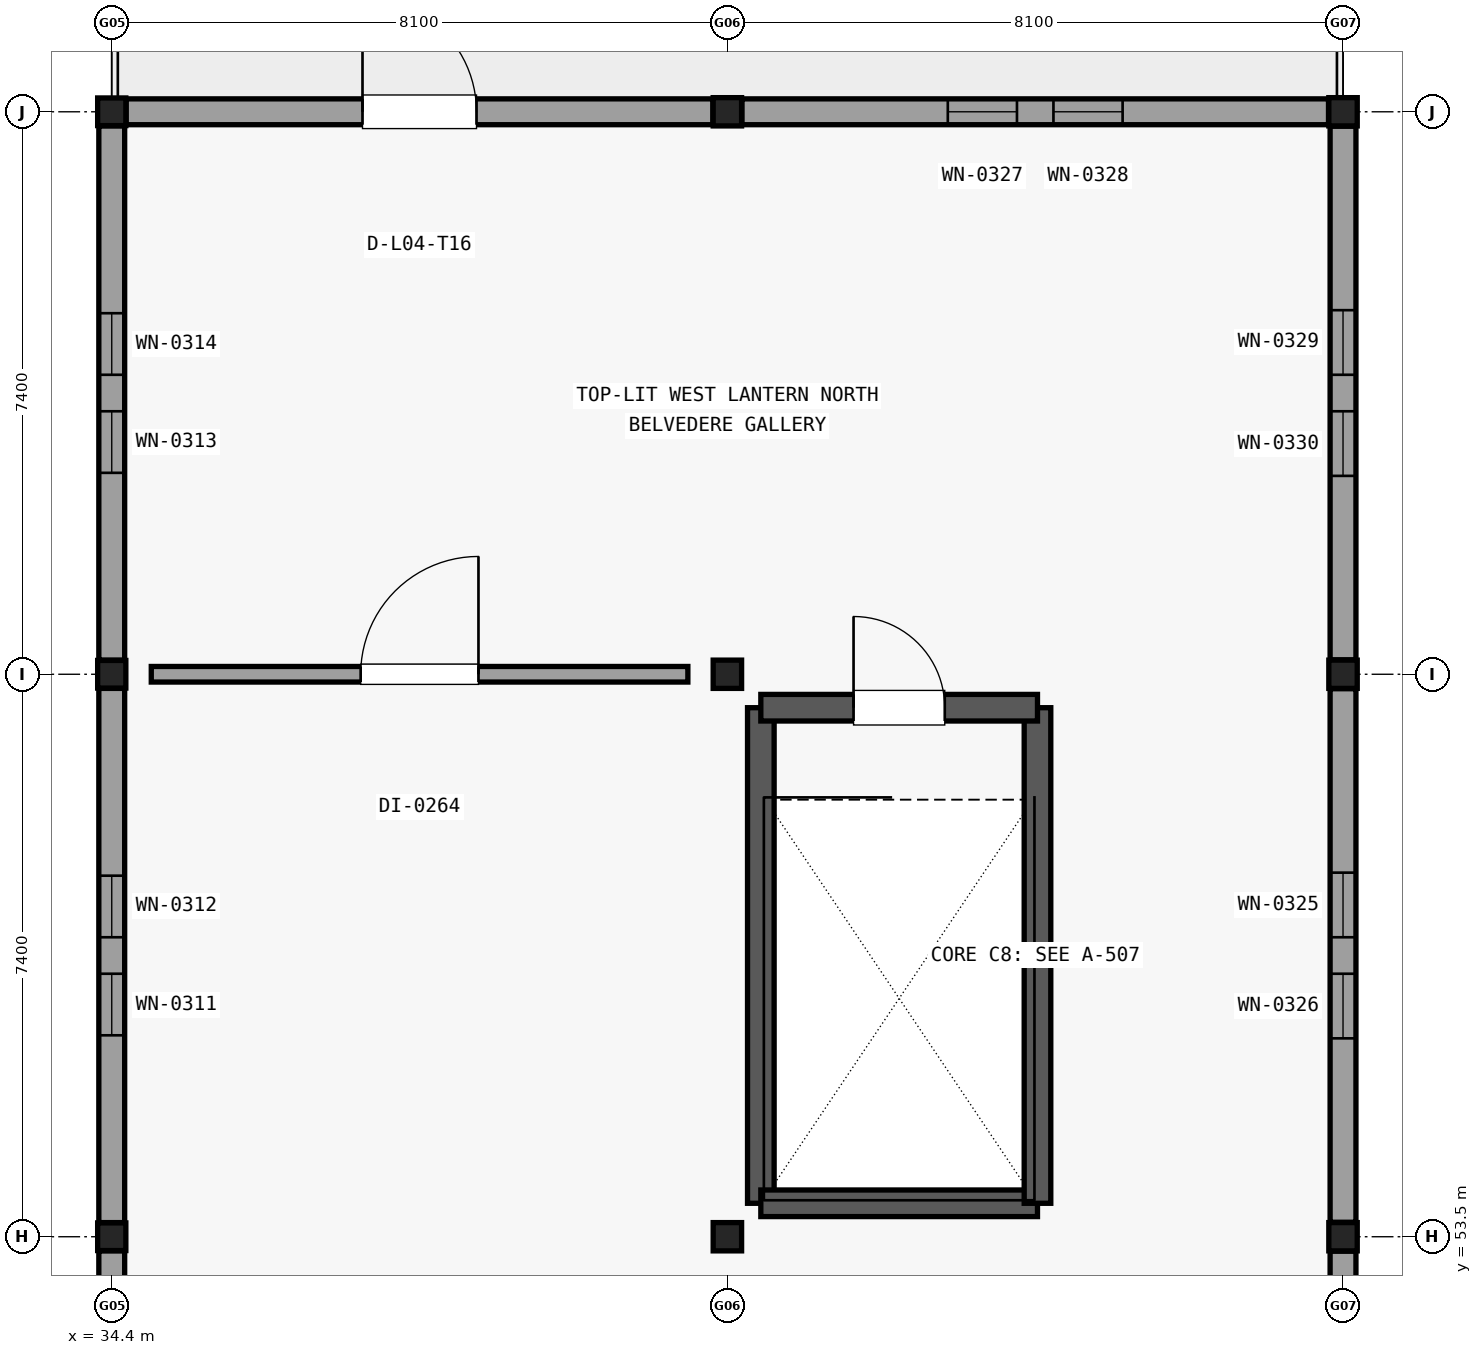
"""IFC4 building model, lengths in metres.
Left out: names, types, materials, properties, quantities, classifications, styles, units other than length and angle.
Written with IfcOpenShell. Run it as: python <this file> out.ifc"""

import sys

from ifc_helpers import new_model, si_unit, direction, frame, frame_2d, origin, origin_2d, place, context, subcontext, project, spatial, rectangle, i_section, extrude, element, fill, save


model = new_model("IFC4")
c1 = context("Model", 3, precision=1e-05, world=origin(), true_north=direction((0.0, 1.0)))
c2 = subcontext(c1, "Body", "Model", "MODEL_VIEW")
j1 = project(units=[si_unit("LENGTHUNIT", "METRE"), si_unit("PLANEANGLEUNIT", "RADIAN")], contexts=[c1])
p1 = place(None, origin())
s1 = spatial("IfcSite", under=j1, at=p1, CompositionType="ELEMENT")
p2 = place(p1, origin())
s2 = spatial("IfcBuilding", under=s1, at=p2, CompositionType="ELEMENT")
p3 = place(p2, frame((0.0, 0.0, 17.4)))
s3 = spatial("IfcBuildingStorey", under=s2, at=p3, CompositionType="ELEMENT", Elevation=17.4)
for number, where, z_axis, x_axis in (
    (1, (34.4, 53.5, 0.0), (0.0, 0.0, 1.0), (1.0, 0.0, 0.0)),
    (2, (34.4, 60.9, 0.0), (0.0, 0.0, 1.0), (1.0, 0.0, 0.0)),
    (3, (34.4, 68.3, 0.0), (0.0, 0.0, 1.0), (1.0, 0.0, 0.0)),
):
    element("IfcColumn", number, at=place(p3, frame(where, z_axis=z_axis, x_axis=x_axis)), inside=s3, PredefinedType="COLUMN", context=c2, shape_type="SweptSolid", body=[
        extrude(i_section(OverallWidth=0.371, OverallDepth=0.364, WebThickness=0.013, FlangeThickness=0.022, at=origin_2d()), origin(), (0.0, 0.0, 1.0), 3.38),
    ])
for number, where, z_axis, x_axis in (
    (4, (42.5, 53.5, 0.0), (0.0, 0.0, 1.0), (1.0, 0.0, 0.0)),
    (5, (42.5, 60.9, 0.0), (0.0, 0.0, 1.0), (1.0, 0.0, 0.0)),
    (6, (42.5, 68.3, 0.0), (0.0, 0.0, 1.0), (1.0, 0.0, 0.0)),
    (7, (50.6, 53.5, 0.0), (0.0, 0.0, 1.0), (1.0, 0.0, 0.0)),
    (8, (50.6, 60.9, 0.0), (0.0, 0.0, 1.0), (1.0, 0.0, 0.0)),
    (9, (50.6, 68.3, 0.0), (0.0, 0.0, 1.0), (1.0, 0.0, 0.0)),
):
    element("IfcColumn", number, at=place(p3, frame(where, z_axis=z_axis, x_axis=x_axis)), inside=s3, PredefinedType="COLUMN", context=c2, shape_type="SweptSolid", body=[
        extrude(i_section(OverallWidth=0.374, OverallDepth=0.372, WebThickness=0.016, FlangeThickness=0.026, at=origin_2d()), origin(), (0.0, 0.0, 1.0), 3.38),
    ])
p4 = place(p3, frame((34.4, 46.286, 0.0), z_axis=(0.0, 0.0, 1.0), x_axis=(0.0, 1.0, 0.0)))
e10 = element("IfcWall", 10, at=p4, inside=s3, PredefinedType="SOLIDWALL", context=c2, shape_type="SweptSolid", body=[
    extrude(rectangle(XDim=7.028, YDim=0.34, at=frame_2d((3.514, 0.0))), origin(), (0.0, 0.0, 1.0), 2.908),
])
p5 = place(p4, frame((2.464, 0.0, 0.6)))
e11 = element("IfcOpeningElement", 11, at=p5, cuts=e10, PredefinedType="OPENING", context=c2, shape_type="SweptSolid", body=[
    extrude(rectangle(XDim=0.81, YDim=1.84, at=frame_2d((0.405, 0.92))), frame((0.0, 0.18, 0.0), z_axis=(0.0, -1.0, 0.0), x_axis=(1.0, 0.0, 0.0)), (0.0, 0.0, 1.0), 0.36),
])
p6 = place(p4, frame((3.754, 0.0, 0.6)))
e12 = element("IfcOpeningElement", 12, at=p6, cuts=e10, PredefinedType="OPENING", context=c2, shape_type="SweptSolid", body=[
    extrude(rectangle(XDim=0.81, YDim=1.84, at=frame_2d((0.405, 0.92))), frame((0.0, 0.18, 0.0), z_axis=(0.0, -1.0, 0.0), x_axis=(1.0, 0.0, 0.0)), (0.0, 0.0, 1.0), 0.36),
])
p7 = place(p3, frame((34.4, 53.686, 0.0), z_axis=(0.0, 0.0, 1.0), x_axis=(0.0, 1.0, 0.0)))
e13 = element("IfcWall", 13, at=p7, inside=s3, PredefinedType="SOLIDWALL", context=c2, shape_type="SweptSolid", body=[
    extrude(rectangle(XDim=7.028, YDim=0.34, at=frame_2d((3.514, 0.0))), origin(), (0.0, 0.0, 1.0), 2.908),
])
p8 = place(p7, frame((2.464, 0.0, 0.6)))
e14 = element("IfcOpeningElement", 14, at=p8, cuts=e13, PredefinedType="OPENING", context=c2, shape_type="SweptSolid", body=[
    extrude(rectangle(XDim=0.81, YDim=1.84, at=frame_2d((0.405, 0.92))), frame((0.0, 0.18, 0.0), z_axis=(0.0, -1.0, 0.0), x_axis=(1.0, 0.0, 0.0)), (0.0, 0.0, 1.0), 0.36),
])
p9 = place(p7, frame((3.754, 0.0, 0.6)))
e15 = element("IfcOpeningElement", 15, at=p9, cuts=e13, PredefinedType="OPENING", context=c2, shape_type="SweptSolid", body=[
    extrude(rectangle(XDim=0.81, YDim=1.84, at=frame_2d((0.405, 0.92))), frame((0.0, 0.18, 0.0), z_axis=(0.0, -1.0, 0.0), x_axis=(1.0, 0.0, 0.0)), (0.0, 0.0, 1.0), 0.36),
])
p10 = place(p3, frame((34.59, 68.3, 0.0), z_axis=(0.0, 0.0, 1.0), x_axis=(1.0, 0.0, 0.0)))
e16 = element("IfcWall", 16, at=p10, inside=s3, PredefinedType="SOLIDWALL", context=c2, shape_type="SweptSolid", body=[
    extrude(rectangle(XDim=7.719, YDim=0.34, at=frame_2d((3.86, 0.0))), origin(), (0.0, 0.0, 1.0), 2.908),
])
p11 = place(p10, frame((3.11, 0.0, 0.0)))
e17 = element("IfcOpeningElement", 17, at=p11, cuts=e16, PredefinedType="OPENING", context=c2, shape_type="SweptSolid", body=[
    extrude(rectangle(XDim=1.5, YDim=2.1, at=frame_2d((0.75, 1.05))), frame((0.0, 0.18, 0.0), z_axis=(0.0, -1.0, 0.0), x_axis=(1.0, 0.0, 0.0)), (0.0, 0.0, 1.0), 0.36),
])
p12 = place(p3, frame((34.4, 61.086, 0.0), z_axis=(0.0, 0.0, 1.0), x_axis=(0.0, 1.0, 0.0)))
e18 = element("IfcWall", 18, at=p12, inside=s3, PredefinedType="SOLIDWALL", context=c2, shape_type="SweptSolid", body=[
    extrude(rectangle(XDim=7.028, YDim=0.34, at=frame_2d((3.514, 0.0))), origin(), (0.0, 0.0, 1.0), 2.908),
])
p13 = place(p12, frame((2.464, 0.0, 0.6)))
e19 = element("IfcOpeningElement", 19, at=p13, cuts=e18, PredefinedType="OPENING", context=c2, shape_type="SweptSolid", body=[
    extrude(rectangle(XDim=0.81, YDim=1.84, at=frame_2d((0.405, 0.92))), frame((0.0, 0.18, 0.0), z_axis=(0.0, -1.0, 0.0), x_axis=(1.0, 0.0, 0.0)), (0.0, 0.0, 1.0), 0.36),
])
p14 = place(p12, frame((3.754, 0.0, 0.6)))
e20 = element("IfcOpeningElement", 20, at=p14, cuts=e18, PredefinedType="OPENING", context=c2, shape_type="SweptSolid", body=[
    extrude(rectangle(XDim=0.81, YDim=1.84, at=frame_2d((0.405, 0.92))), frame((0.0, 0.18, 0.0), z_axis=(0.0, -1.0, 0.0), x_axis=(1.0, 0.0, 0.0)), (0.0, 0.0, 1.0), 0.36),
])
p15 = place(p3, frame((50.6, 53.31, 0.0), z_axis=(0.0, 0.0, 1.0), x_axis=(0.0, -1.0, 0.0)))
e21 = element("IfcWall", 21, at=p15, inside=s3, PredefinedType="SOLIDWALL", context=c2, shape_type="SweptSolid", body=[
    extrude(rectangle(XDim=7.02, YDim=0.34, at=frame_2d((3.51, 0.0))), origin(), (0.0, 0.0, 1.0), 2.908),
])
p16 = place(p15, frame((2.42, 0.0, 0.6)))
e22 = element("IfcOpeningElement", 22, at=p16, cuts=e21, PredefinedType="OPENING", context=c2, shape_type="SweptSolid", body=[
    extrude(rectangle(XDim=0.85, YDim=1.88, at=frame_2d((0.425, 0.94))), frame((0.0, 0.18, 0.0), z_axis=(0.0, -1.0, 0.0), x_axis=(1.0, 0.0, 0.0)), (0.0, 0.0, 1.0), 0.36),
])
p17 = place(p15, frame((3.75, 0.0, 0.6)))
e23 = element("IfcOpeningElement", 23, at=p17, cuts=e21, PredefinedType="OPENING", context=c2, shape_type="SweptSolid", body=[
    extrude(rectangle(XDim=0.85, YDim=1.88, at=frame_2d((0.425, 0.94))), frame((0.0, 0.18, 0.0), z_axis=(0.0, -1.0, 0.0), x_axis=(1.0, 0.0, 0.0)), (0.0, 0.0, 1.0), 0.36),
])
p18 = place(p3, frame((50.6, 60.71, 0.0), z_axis=(0.0, 0.0, 1.0), x_axis=(0.0, -1.0, 0.0)))
e24 = element("IfcWall", 24, at=p18, inside=s3, PredefinedType="SOLIDWALL", context=c2, shape_type="SweptSolid", body=[
    extrude(rectangle(XDim=7.02, YDim=0.34, at=frame_2d((3.51, 0.0))), origin(), (0.0, 0.0, 1.0), 2.908),
])
p19 = place(p18, frame((2.42, 0.0, 0.6)))
e25 = element("IfcOpeningElement", 25, at=p19, cuts=e24, PredefinedType="OPENING", context=c2, shape_type="SweptSolid", body=[
    extrude(rectangle(XDim=0.85, YDim=1.88, at=frame_2d((0.425, 0.94))), frame((0.0, 0.18, 0.0), z_axis=(0.0, -1.0, 0.0), x_axis=(1.0, 0.0, 0.0)), (0.0, 0.0, 1.0), 0.36),
])
p20 = place(p18, frame((3.75, 0.0, 0.6)))
e26 = element("IfcOpeningElement", 26, at=p20, cuts=e24, PredefinedType="OPENING", context=c2, shape_type="SweptSolid", body=[
    extrude(rectangle(XDim=0.85, YDim=1.88, at=frame_2d((0.425, 0.94))), frame((0.0, 0.18, 0.0), z_axis=(0.0, -1.0, 0.0), x_axis=(1.0, 0.0, 0.0)), (0.0, 0.0, 1.0), 0.36),
])
p21 = place(p3, frame((42.691, 68.3, 0.0), z_axis=(0.0, 0.0, 1.0), x_axis=(1.0, 0.0, 0.0)))
e27 = element("IfcWall", 27, at=p21, inside=s3, PredefinedType="SOLIDWALL", context=c2, shape_type="SweptSolid", body=[
    extrude(rectangle(XDim=7.718, YDim=0.34, at=frame_2d((3.859, 0.0))), origin(), (0.0, 0.0, 1.0), 2.908),
])
p22 = place(p21, frame((2.709, 0.0, 0.6)))
e28 = element("IfcOpeningElement", 28, at=p22, cuts=e27, PredefinedType="OPENING", context=c2, shape_type="SweptSolid", body=[
    extrude(rectangle(XDim=0.91, YDim=1.94, at=frame_2d((0.455, 0.97))), frame((0.0, 0.18, 0.0), z_axis=(0.0, -1.0, 0.0), x_axis=(1.0, 0.0, 0.0)), (0.0, 0.0, 1.0), 0.36),
])
p23 = place(p21, frame((4.099, 0.0, 0.6)))
e29 = element("IfcOpeningElement", 29, at=p23, cuts=e27, PredefinedType="OPENING", context=c2, shape_type="SweptSolid", body=[
    extrude(rectangle(XDim=0.91, YDim=1.94, at=frame_2d((0.455, 0.97))), frame((0.0, 0.18, 0.0), z_axis=(0.0, -1.0, 0.0), x_axis=(1.0, 0.0, 0.0)), (0.0, 0.0, 1.0), 0.36),
])
p24 = place(p3, frame((50.6, 68.11, 0.0), z_axis=(0.0, 0.0, 1.0), x_axis=(0.0, -1.0, 0.0)))
e30 = element("IfcWall", 30, at=p24, inside=s3, PredefinedType="SOLIDWALL", context=c2, shape_type="SweptSolid", body=[
    extrude(rectangle(XDim=7.02, YDim=0.34, at=frame_2d((3.51, 0.0))), origin(), (0.0, 0.0, 1.0), 2.908),
])
p25 = place(p24, frame((2.42, 0.0, 0.6)))
e31 = element("IfcOpeningElement", 31, at=p25, cuts=e30, PredefinedType="OPENING", context=c2, shape_type="SweptSolid", body=[
    extrude(rectangle(XDim=0.85, YDim=1.88, at=frame_2d((0.425, 0.94))), frame((0.0, 0.18, 0.0), z_axis=(0.0, -1.0, 0.0), x_axis=(1.0, 0.0, 0.0)), (0.0, 0.0, 1.0), 0.36),
])
p26 = place(p24, frame((3.75, 0.0, 0.6)))
e32 = element("IfcOpeningElement", 32, at=p26, cuts=e30, PredefinedType="OPENING", context=c2, shape_type="SweptSolid", body=[
    extrude(rectangle(XDim=0.85, YDim=1.88, at=frame_2d((0.425, 0.94))), frame((0.0, 0.18, 0.0), z_axis=(0.0, -1.0, 0.0), x_axis=(1.0, 0.0, 0.0)), (0.0, 0.0, 1.0), 0.36),
])
p27 = place(p3, frame((42.94, 53.94, 0.0), z_axis=(0.0, 0.0, 1.0), x_axis=(0.0, 1.0, 0.0)))
e33 = element("IfcWall", 33, at=p27, inside=s3, PredefinedType="SHEAR", context=c2, shape_type="SweptSolid", body=[
    extrude(rectangle(XDim=6.52, YDim=0.35, at=frame_2d((3.26, 0.0))), origin(), (0.0, 0.0, 1.0), 3.375),
])
p28 = place(p3, frame((42.94, 53.94, 0.0), z_axis=(0.0, 0.0, 1.0), x_axis=(1.0, 0.0, 0.0)))
e34 = element("IfcWall", 34, at=p28, inside=s3, PredefinedType="SHEAR", context=c2, shape_type="SweptSolid", body=[
    extrude(rectangle(XDim=3.64, YDim=0.35, at=frame_2d((1.82, 0.0))), origin(), (0.0, 0.0, 1.0), 3.375),
])
p29 = place(p3, frame((46.58, 53.94, 0.0), z_axis=(0.0, 0.0, 1.0), x_axis=(0.0, 1.0, 0.0)))
e35 = element("IfcWall", 35, at=p29, inside=s3, PredefinedType="SHEAR", context=c2, shape_type="SweptSolid", body=[
    extrude(rectangle(XDim=6.52, YDim=0.35, at=frame_2d((3.26, 0.0))), origin(), (0.0, 0.0, 1.0), 3.375),
])
p30 = place(p3, frame((42.94, 60.46, 0.0), z_axis=(0.0, 0.0, 1.0), x_axis=(1.0, 0.0, 0.0)))
e36 = element("IfcWall", 36, at=p30, inside=s3, PredefinedType="SHEAR", context=c2, shape_type="SweptSolid", body=[
    extrude(rectangle(XDim=3.64, YDim=0.35, at=frame_2d((1.82, 0.0))), origin(), (0.0, 0.0, 1.0), 3.375),
])
p31 = place(p30, frame((1.22, 0.0, 0.0)))
e37 = element("IfcOpeningElement", 37, at=p31, cuts=e36, PredefinedType="OPENING", context=c2, shape_type="SweptSolid", body=[
    extrude(rectangle(XDim=1.2, YDim=2.15, at=frame_2d((0.6, 1.075))), frame((0.0, 0.185, 0.0), z_axis=(0.0, -1.0, 0.0), x_axis=(1.0, 0.0, 0.0)), (0.0, 0.0, 1.0), 0.37),
])
p32 = place(p3, frame((34.92, 60.9, 0.0), z_axis=(0.0, 0.0, 1.0), x_axis=(1.0, 0.0, 0.0)))
e38 = element("IfcWall", 38, at=p32, inside=s3, PredefinedType="PARTITIONING", context=c2, shape_type="SweptSolid", body=[
    extrude(rectangle(XDim=7.06, YDim=0.205, at=frame_2d((3.53, 0.0))), origin(), (0.0, 0.0, 1.0), 2.913),
])
p33 = place(p32, frame((2.755, 0.0, 0.0)))
e39 = element("IfcOpeningElement", 39, at=p33, cuts=e38, PredefinedType="OPENING", context=c2, shape_type="SweptSolid", body=[
    extrude(rectangle(XDim=1.55, YDim=2.2, at=frame_2d((0.775, 1.1))), frame((0.0, 0.113, 0.0), z_axis=(0.0, -1.0, 0.0), x_axis=(1.0, 0.0, 0.0)), (0.0, 0.0, 1.0), 0.225),
])
p34 = place(p8, origin())
e40 = element("IfcWindow", 40, at=p34, inside=s3, PartitioningType="SINGLE_PANEL", PredefinedType="WINDOW", context=c2, shape_type="SweptSolid", body=[
    extrude(rectangle(XDim=0.81, YDim=1.84, at=frame_2d((0.405, 0.92))), frame((0.0, 0.03, 0.0), z_axis=(0.0, -1.0, 0.0), x_axis=(1.0, 0.0, 0.0)), (0.0, 0.0, 1.0), 0.06),
])
fill(e14, e40)
p35 = place(p9, origin())
e41 = element("IfcWindow", 41, at=p35, inside=s3, PartitioningType="SINGLE_PANEL", PredefinedType="WINDOW", context=c2, shape_type="SweptSolid", body=[
    extrude(rectangle(XDim=0.81, YDim=1.84, at=frame_2d((0.405, 0.92))), frame((0.0, 0.03, 0.0), z_axis=(0.0, -1.0, 0.0), x_axis=(1.0, 0.0, 0.0)), (0.0, 0.0, 1.0), 0.06),
])
fill(e15, e41)
p36 = place(p11, origin())
e42 = element("IfcDoor", 42, at=p36, inside=s3, OperationType="SINGLE_SWING_LEFT", PredefinedType="DOOR", context=c2, shape_type="SweptSolid", body=[
    extrude(rectangle(XDim=1.5, YDim=2.1, at=frame_2d((0.75, 1.05))), frame((0.0, 0.025, 0.0), z_axis=(0.0, -1.0, 0.0), x_axis=(1.0, 0.0, 0.0)), (0.0, 0.0, 1.0), 0.05),
])
fill(e17, e42)
p37 = place(p13, origin())
e43 = element("IfcWindow", 43, at=p37, inside=s3, PartitioningType="SINGLE_PANEL", PredefinedType="WINDOW", context=c2, shape_type="SweptSolid", body=[
    extrude(rectangle(XDim=0.81, YDim=1.84, at=frame_2d((0.405, 0.92))), frame((0.0, 0.03, 0.0), z_axis=(0.0, -1.0, 0.0), x_axis=(1.0, 0.0, 0.0)), (0.0, 0.0, 1.0), 0.06),
])
fill(e19, e43)
p38 = place(p14, origin())
e44 = element("IfcWindow", 44, at=p38, inside=s3, PartitioningType="SINGLE_PANEL", PredefinedType="WINDOW", context=c2, shape_type="SweptSolid", body=[
    extrude(rectangle(XDim=0.81, YDim=1.84, at=frame_2d((0.405, 0.92))), frame((0.0, 0.03, 0.0), z_axis=(0.0, -1.0, 0.0), x_axis=(1.0, 0.0, 0.0)), (0.0, 0.0, 1.0), 0.06),
])
fill(e20, e44)
p39 = place(p19, origin())
e45 = element("IfcWindow", 45, at=p39, inside=s3, PartitioningType="SINGLE_PANEL", PredefinedType="WINDOW", context=c2, shape_type="SweptSolid", body=[
    extrude(rectangle(XDim=0.85, YDim=1.88, at=frame_2d((0.425, 0.94))), frame((0.0, 0.03, 0.0), z_axis=(0.0, -1.0, 0.0), x_axis=(1.0, 0.0, 0.0)), (0.0, 0.0, 1.0), 0.06),
])
fill(e25, e45)
p40 = place(p20, origin())
e46 = element("IfcWindow", 46, at=p40, inside=s3, PartitioningType="SINGLE_PANEL", PredefinedType="WINDOW", context=c2, shape_type="SweptSolid", body=[
    extrude(rectangle(XDim=0.85, YDim=1.88, at=frame_2d((0.425, 0.94))), frame((0.0, 0.03, 0.0), z_axis=(0.0, -1.0, 0.0), x_axis=(1.0, 0.0, 0.0)), (0.0, 0.0, 1.0), 0.06),
])
fill(e26, e46)
p41 = place(p22, origin())
e47 = element("IfcWindow", 47, at=p41, inside=s3, PartitioningType="SINGLE_PANEL", PredefinedType="WINDOW", context=c2, shape_type="SweptSolid", body=[
    extrude(rectangle(XDim=0.91, YDim=1.94, at=frame_2d((0.455, 0.97))), frame((0.0, 0.03, 0.0), z_axis=(0.0, -1.0, 0.0), x_axis=(1.0, 0.0, 0.0)), (0.0, 0.0, 1.0), 0.06),
])
fill(e28, e47)
p42 = place(p23, origin())
e48 = element("IfcWindow", 48, at=p42, inside=s3, PartitioningType="SINGLE_PANEL", PredefinedType="WINDOW", context=c2, shape_type="SweptSolid", body=[
    extrude(rectangle(XDim=0.91, YDim=1.94, at=frame_2d((0.455, 0.97))), frame((0.0, 0.03, 0.0), z_axis=(0.0, -1.0, 0.0), x_axis=(1.0, 0.0, 0.0)), (0.0, 0.0, 1.0), 0.06),
])
fill(e29, e48)
p43 = place(p25, origin())
e49 = element("IfcWindow", 49, at=p43, inside=s3, PartitioningType="SINGLE_PANEL", PredefinedType="WINDOW", context=c2, shape_type="SweptSolid", body=[
    extrude(rectangle(XDim=0.85, YDim=1.88, at=frame_2d((0.425, 0.94))), frame((0.0, 0.03, 0.0), z_axis=(0.0, -1.0, 0.0), x_axis=(1.0, 0.0, 0.0)), (0.0, 0.0, 1.0), 0.06),
])
fill(e31, e49)
p44 = place(p26, origin())
e50 = element("IfcWindow", 50, at=p44, inside=s3, PartitioningType="SINGLE_PANEL", PredefinedType="WINDOW", context=c2, shape_type="SweptSolid", body=[
    extrude(rectangle(XDim=0.85, YDim=1.88, at=frame_2d((0.425, 0.94))), frame((0.0, 0.03, 0.0), z_axis=(0.0, -1.0, 0.0), x_axis=(1.0, 0.0, 0.0)), (0.0, 0.0, 1.0), 0.06),
])
fill(e32, e50)
p45 = place(p31, origin())
e51 = element("IfcDoor", 51, at=p45, inside=s3, OperationType="SINGLE_SWING_LEFT", PredefinedType="DOOR", context=c2, shape_type="SweptSolid", body=[
    extrude(rectangle(XDim=1.2, YDim=2.15, at=frame_2d((0.6, 1.075))), frame((0.0, 0.025, 0.0), z_axis=(0.0, -1.0, 0.0), x_axis=(1.0, 0.0, 0.0)), (0.0, 0.0, 1.0), 0.05),
])
fill(e37, e51)
p46 = place(p33, origin())
e52 = element("IfcDoor", 52, at=p46, inside=s3, OperationType="SINGLE_SWING_RIGHT", PredefinedType="DOOR", context=c2, shape_type="SweptSolid", body=[
    extrude(rectangle(XDim=1.55, YDim=2.2, at=frame_2d((0.775, 1.1))), frame((0.0, 0.025, 0.0), z_axis=(0.0, -1.0, 0.0), x_axis=(1.0, 0.0, 0.0)), (0.0, 0.0, 1.0), 0.05),
])
fill(e39, e52)
save(model, sys.argv[1])
